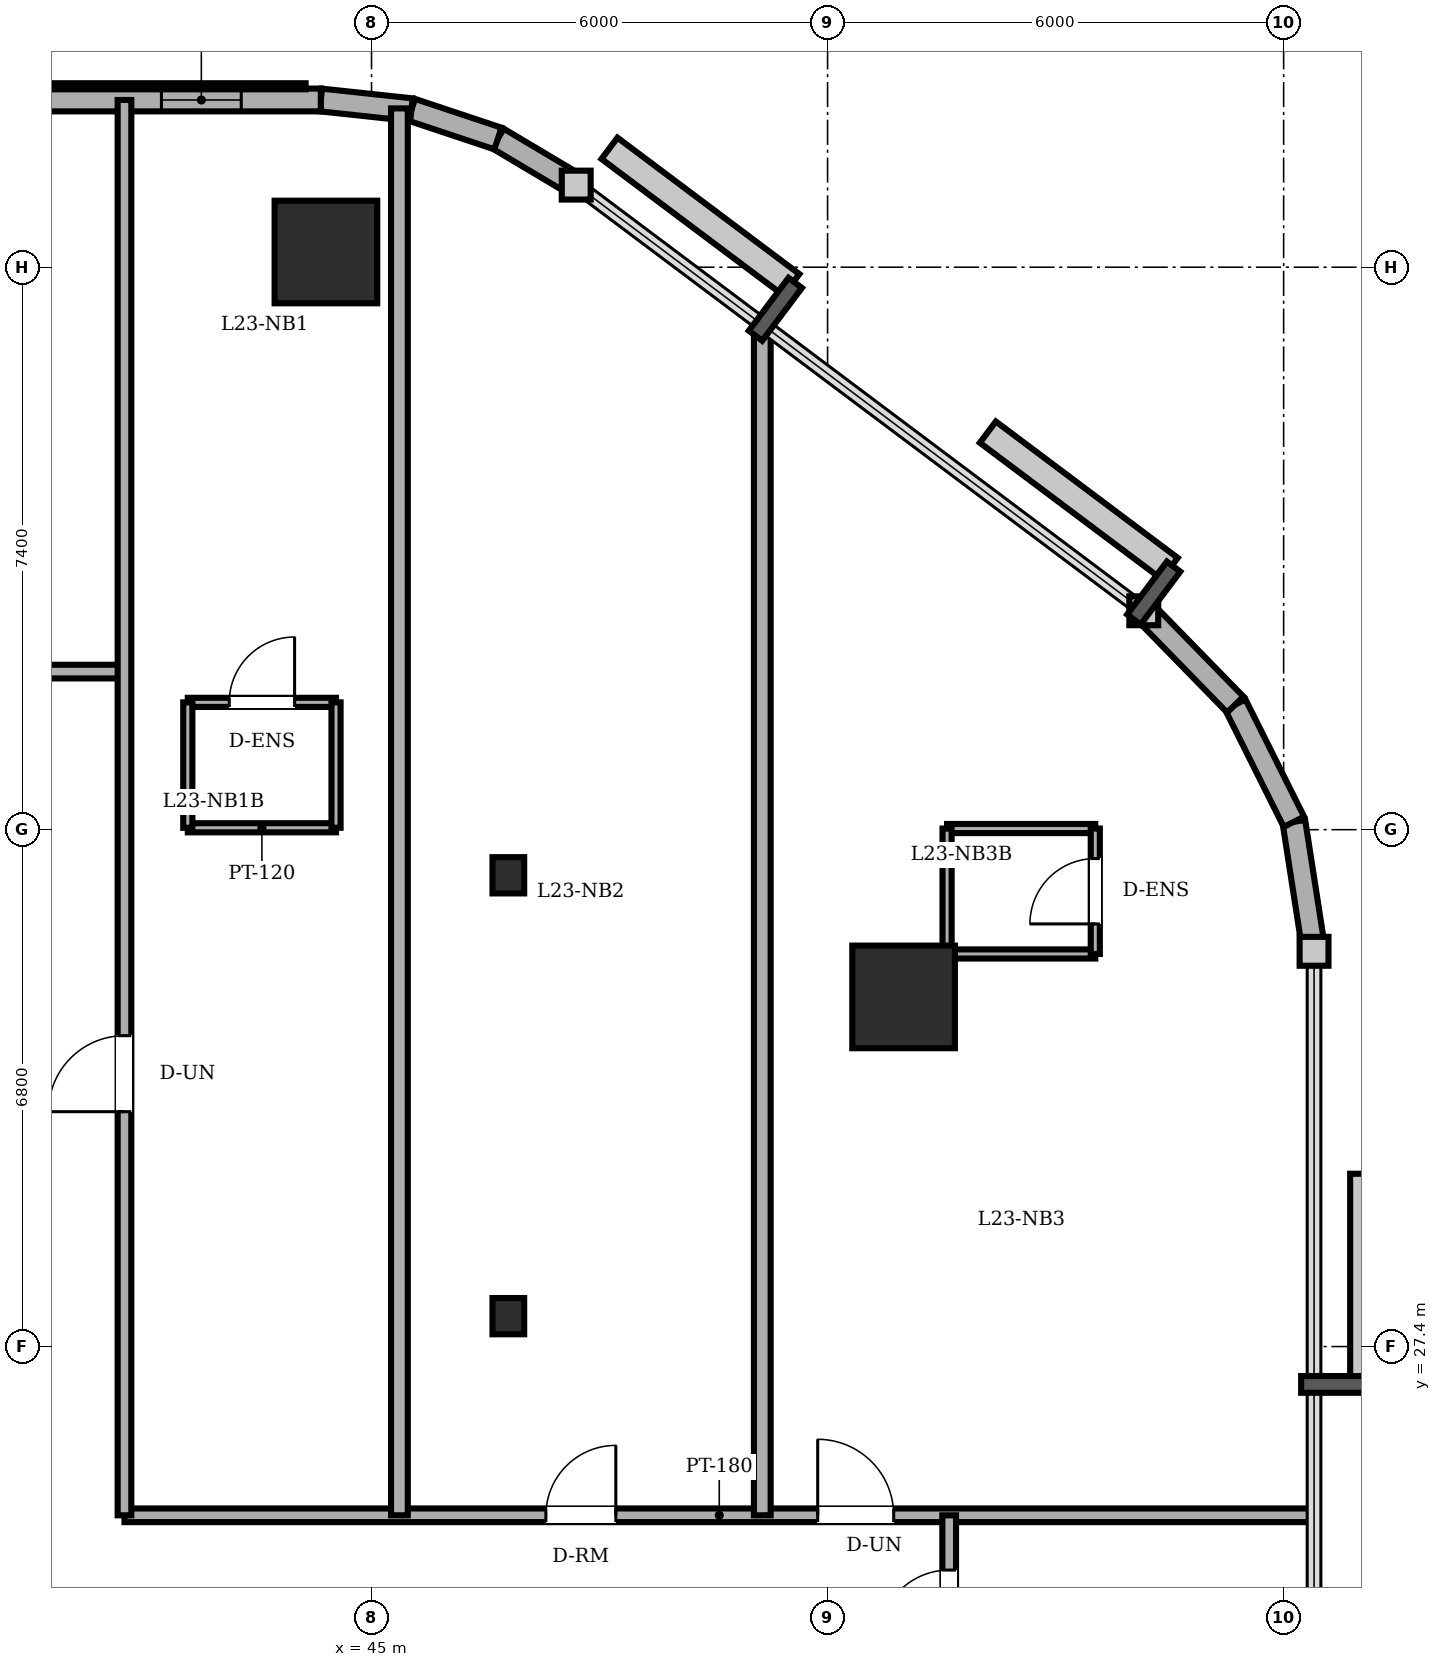
"""IFC4 building model, lengths in metres.
Left out: names, types, materials, properties, quantities, classifications, styles, units other than length and angle.
Written with IfcOpenShell. Run it as: python <this file> out.ifc"""

import sys

from ifc_helpers import new_model, si_unit, direction, frame, frame_2d, origin, origin_2d, place, context, subcontext, project, spatial, rectangle, circle, i_section, extrude, element, fill, save


model = new_model("IFC4")
c1 = context("Model", 3, precision=1e-05, world=origin(), true_north=direction((0.0, 1.0)))
c2 = subcontext(c1, "Body", "Model", "MODEL_VIEW")
j1 = project(units=[si_unit("LENGTHUNIT", "METRE"), si_unit("PLANEANGLEUNIT", "RADIAN")], contexts=[c1])
p1 = place(None, origin())
s1 = spatial("IfcSite", under=j1, at=p1, CompositionType="ELEMENT")
p2 = place(p1, origin())
s2 = spatial("IfcBuilding", under=s1, at=p2, CompositionType="ELEMENT")
p3 = place(p2, frame((0.0, 0.0, 89.9)))
s3 = spatial("IfcBuildingStorey", under=s2, at=p3, CompositionType="ELEMENT", Elevation=89.9)
for number, where, z_axis, x_axis in (
    (1, (52.0, 32.0, 0.0), (0.0, 0.0, 1.0), (1.0, 0.0, 0.0)),
    (2, (44.4, 41.8, 0.0), (0.0, 0.0, 1.0), (1.0, 0.0, 0.0)),
):
    element("IfcColumn", number, at=place(p3, frame(where, z_axis=z_axis, x_axis=x_axis)), inside=s3, PredefinedType="COLUMN", context=c2, shape_type="SweptSolid", body=[
        extrude(circle(Radius=0.675, at=origin_2d()), origin(), (0.0, 0.0, 1.0), 3.6),
    ])
for number, where, z_axis, x_axis in (
    (3, (46.8, 27.8, 0.0), (0.0, 0.0, 1.0), (1.0, 0.0, 0.0)),
    (4, (46.8, 33.6, 0.0), (0.0, 0.0, 1.0), (1.0, 0.0, 0.0)),
):
    element("IfcColumn", number, at=place(p3, frame(where, z_axis=z_axis, x_axis=x_axis)), inside=s3, PredefinedType="COLUMN", context=c2, shape_type="SweptSolid", body=[
        extrude(i_section(OverallWidth=0.417, OverallDepth=0.477, WebThickness=0.036, FlangeThickness=0.057, FilletRadius=0.015, at=origin_2d()), origin(), (0.0, 0.0, 1.0), 3.6),
    ])
p4 = place(p3, frame((57.4, 32.6, 0.0), z_axis=(0.0, 0.0, 1.0), x_axis=(-0.153620989032, 0.988129845581, 0.0)))
e5 = element("IfcWall", 5, at=p4, inside=s3, PredefinedType="SOLIDWALL", context=c2, shape_type="SweptSolid", body=[
    extrude(rectangle(XDim=1.724, YDim=0.3, at=frame_2d((0.862, 0.0))), origin(), (0.0, 0.0, 1.0), 3.4),
])
for number, where, z_axis, x_axis in (
    (6, (57.135, 34.304, 0.0), (0.0, 0.0, 1.0), (-0.447, 0.894, 0.0)),
    (7, (56.364, 35.846, 0.0), (0.0, 0.0, 1.0), (-0.698, 0.716, 0.0)),
):
    element("IfcWall", number, at=place(p3, frame(where, z_axis=z_axis, x_axis=x_axis)), inside=s3, PredefinedType="SOLIDWALL", context=c2, shape_type="SweptSolid", body=[
        extrude(rectangle(XDim=1.724, YDim=0.3, at=frame_2d((0.862, 0.0))), origin(), (0.0, 0.0, 1.0), 3.4),
    ])
p5 = place(p3, frame((47.693, 42.68, 0.0), z_axis=(0.0, 0.0, 1.0), x_axis=(-0.859320591642, 0.511437308749, 0.0)))
e8 = element("IfcWall", 8, at=p5, inside=s3, PredefinedType="SOLIDWALL", context=c2, shape_type="SweptSolid", body=[
    extrude(rectangle(XDim=1.199, YDim=0.3, at=frame_2d((0.599, 0.0))), origin(), (0.0, 0.0, 1.0), 3.4),
])
p6 = place(p3, frame((46.663, 43.293, 0.0), z_axis=(0.0, 0.0, 1.0), x_axis=(-0.948744332129, 0.316044604847, 0.0)))
e9 = element("IfcWall", 9, at=p6, inside=s3, PredefinedType="SOLIDWALL", context=c2, shape_type="SweptSolid", body=[
    extrude(rectangle(XDim=1.2, YDim=0.3, at=frame_2d((0.6, 0.0))), origin(), (0.0, 0.0, 1.0), 3.4),
])
p7 = place(p3, frame((45.525, 43.672, 0.0), z_axis=(0.0, 0.0, 1.0), x_axis=(-0.994289103787, 0.106720092254, 0.0)))
e10 = element("IfcWall", 10, at=p7, inside=s3, PredefinedType="SOLIDWALL", context=c2, shape_type="SweptSolid", body=[
    extrude(rectangle(XDim=1.199, YDim=0.3, at=frame_2d((0.599, 0.0))), origin(), (0.0, 0.0, 1.0), 3.4),
])
p8 = place(p3, frame((44.333, 43.8, 0.0), z_axis=(0.0, 0.0, 1.0), x_axis=(-1.0, 0.0, 0.0)))
e11 = element("IfcWall", 11, at=p8, inside=s3, PredefinedType="SOLIDWALL", context=c2, shape_type="SweptSolid", body=[
    extrude(rectangle(XDim=29.933, YDim=0.3, at=frame_2d((14.967, 0.0))), origin(), (0.0, 0.0, 1.0), 3.4),
])
p9 = place(p8, frame((24.058, 0.0, 0.0)))
e12 = element("IfcOpeningElement", 12, at=p9, cuts=e11, PredefinedType="OPENING", context=c2, shape_type="SweptSolid", body=[
    extrude(rectangle(XDim=0.95, YDim=2.2, at=frame_2d((0.475, 1.1))), frame((0.0, 0.16, 0.0), z_axis=(0.0, -1.0, 0.0), x_axis=(1.0, 0.0, 0.0)), (0.0, 0.0, 1.0), 0.32),
])
p10 = place(p8, frame((5.541, 0.0, 0.85)))
e13 = element("IfcOpeningElement", 13, at=p10, cuts=e11, PredefinedType="OPENING", context=c2, shape_type="SweptSolid", body=[
    extrude(rectangle(XDim=1.65, YDim=1.55, at=frame_2d((0.825, 0.775))), frame((0.0, 0.16, 0.0), z_axis=(0.0, -1.0, 0.0), x_axis=(1.0, 0.0, 0.0)), (0.0, 0.0, 1.0), 0.32),
])
p11 = place(p8, frame((9.325, 0.0, 0.85)))
e14 = element("IfcOpeningElement", 14, at=p11, cuts=e11, PredefinedType="OPENING", context=c2, shape_type="SweptSolid", body=[
    extrude(rectangle(XDim=1.65, YDim=1.55, at=frame_2d((0.825, 0.775))), frame((0.0, 0.16, 0.0), z_axis=(0.0, -1.0, 0.0), x_axis=(1.0, 0.0, 0.0)), (0.0, 0.0, 1.0), 0.32),
])
p12 = place(p8, frame((15.508, 0.0, 0.85)))
e15 = element("IfcOpeningElement", 15, at=p12, cuts=e11, PredefinedType="OPENING", context=c2, shape_type="SweptSolid", body=[
    extrude(rectangle(XDim=1.65, YDim=1.55, at=frame_2d((0.825, 0.775))), frame((0.0, 0.16, 0.0), z_axis=(0.0, -1.0, 0.0), x_axis=(1.0, 0.0, 0.0)), (0.0, 0.0, 1.0), 0.32),
])
p13 = place(p8, frame((17.908, 0.0, 0.85)))
e16 = element("IfcOpeningElement", 16, at=p13, cuts=e11, PredefinedType="OPENING", context=c2, shape_type="SweptSolid", body=[
    extrude(rectangle(XDim=1.65, YDim=1.55, at=frame_2d((0.825, 0.775))), frame((0.0, 0.16, 0.0), z_axis=(0.0, -1.0, 0.0), x_axis=(1.0, 0.0, 0.0)), (0.0, 0.0, 1.0), 0.32),
])
p14 = place(p8, frame((25.941, 0.0, 0.85)))
e17 = element("IfcOpeningElement", 17, at=p14, cuts=e11, PredefinedType="OPENING", context=c2, shape_type="SweptSolid", body=[
    extrude(rectangle(XDim=1.65, YDim=1.55, at=frame_2d((0.825, 0.775))), frame((0.0, 0.16, 0.0), z_axis=(0.0, -1.0, 0.0), x_axis=(1.0, 0.0, 0.0)), (0.0, 0.0, 1.0), 0.32),
])
p15 = place(p8, frame((1.047, 0.0, 0.85)))
e18 = element("IfcOpeningElement", 18, at=p15, cuts=e11, PredefinedType="OPENING", context=c2, shape_type="SweptSolid", body=[
    extrude(rectangle(XDim=1.05, YDim=1.55, at=frame_2d((0.525, 0.775))), frame((0.0, 0.16, 0.0), z_axis=(0.0, -1.0, 0.0), x_axis=(1.0, 0.0, 0.0)), (0.0, 0.0, 1.0), 0.32),
])
p16 = place(p3, frame((42.583, 35.875, 0.0), z_axis=(0.0, 0.0, 1.0), x_axis=(1.0, 0.0, 0.0)))
e19 = element("IfcWall", 19, at=p16, inside=s3, PredefinedType="PARTITIONING", context=c2, shape_type="SweptSolid", body=[
    extrude(rectangle(XDim=1.95, YDim=0.12, at=frame_2d((0.975, 0.0))), origin(), (0.0, 0.0, 1.0), 3.4),
])
p17 = place(p16, frame((0.545, 0.0, 0.0)))
e20 = element("IfcOpeningElement", 20, at=p17, cuts=e19, PredefinedType="OPENING", context=c2, shape_type="SweptSolid", body=[
    extrude(rectangle(XDim=0.86, YDim=2.1, at=frame_2d((0.43, 1.05))), frame((0.0, 0.07, 0.0), z_axis=(0.0, -1.0, 0.0), x_axis=(1.0, 0.0, 0.0)), (0.0, 0.0, 1.0), 0.14),
])
p18 = place(p3, frame((44.533, 34.225, 0.0), z_axis=(0.0, 0.0, 1.0), x_axis=(-1.0, 0.0, 0.0)))
e21 = element("IfcWall", 21, at=p18, inside=s3, PredefinedType="PARTITIONING", context=c2, shape_type="SweptSolid", body=[
    extrude(rectangle(XDim=1.95, YDim=0.12, at=frame_2d((0.975, 0.0))), origin(), (0.0, 0.0, 1.0), 3.4),
])
for number, where, z_axis, x_axis in (
    (22, (42.583, 35.875, 0.0), (0.0, 0.0, 1.0), (0.0, -1.0, 0.0)),
    (23, (44.533, 34.225, 0.0), (0.0, 0.0, 1.0), (0.0, 1.0, 0.0)),
):
    element("IfcWall", number, at=place(p3, frame(where, z_axis=z_axis, x_axis=x_axis)), inside=s3, PredefinedType="PARTITIONING", context=c2, shape_type="SweptSolid", body=[
        extrude(rectangle(XDim=1.65, YDim=0.12, at=frame_2d((0.825, 0.0))), origin(), (0.0, 0.0, 1.0), 3.4),
    ])
for number, where, z_axis, x_axis in (
    (24, (52.572, 34.215, 0.0), (0.0, 0.0, 1.0), (1.0, 0.0, 0.0)),
    (25, (54.522, 32.565, 0.0), (0.0, 0.0, 1.0), (-1.0, 0.0, 0.0)),
):
    element("IfcWall", number, at=place(p3, frame(where, z_axis=z_axis, x_axis=x_axis)), inside=s3, PredefinedType="PARTITIONING", context=c2, shape_type="SweptSolid", body=[
        extrude(rectangle(XDim=1.95, YDim=0.12, at=frame_2d((0.975, 0.0))), origin(), (0.0, 0.0, 1.0), 3.4),
    ])
p19 = place(p3, frame((52.572, 34.215, 0.0), z_axis=(0.0, 0.0, 1.0), x_axis=(0.0, -1.0, 0.0)))
e26 = element("IfcWall", 26, at=p19, inside=s3, PredefinedType="PARTITIONING", context=c2, shape_type="SweptSolid", body=[
    extrude(rectangle(XDim=1.65, YDim=0.12, at=frame_2d((0.825, 0.0))), origin(), (0.0, 0.0, 1.0), 3.4),
])
p20 = place(p3, frame((54.522, 32.565, 0.0), z_axis=(0.0, 0.0, 1.0), x_axis=(0.0, 1.0, 0.0)))
e27 = element("IfcWall", 27, at=p20, inside=s3, PredefinedType="PARTITIONING", context=c2, shape_type="SweptSolid", body=[
    extrude(rectangle(XDim=1.65, YDim=0.12, at=frame_2d((0.825, 0.0))), origin(), (0.0, 0.0, 1.0), 3.4),
])
p21 = place(p20, frame((0.395, 0.0, 0.0)))
e28 = element("IfcOpeningElement", 28, at=p21, cuts=e27, PredefinedType="OPENING", context=c2, shape_type="SweptSolid", body=[
    extrude(rectangle(XDim=0.86, YDim=2.1, at=frame_2d((0.43, 1.05))), frame((0.0, 0.07, 0.0), z_axis=(0.0, -1.0, 0.0), x_axis=(1.0, 0.0, 0.0)), (0.0, 0.0, 1.0), 0.14),
])
p22 = place(p3, frame((41.75, 25.18, 0.0), z_axis=(0.0, 0.0, 1.0), x_axis=(1.0, 0.0, 0.0)))
e29 = element("IfcWall", 29, at=p22, inside=s3, PredefinedType="PARTITIONING", context=c2, shape_type="SweptSolid", body=[
    extrude(rectangle(XDim=15.65, YDim=0.18, at=frame_2d((7.825, 0.0))), origin(), (0.0, 0.0, 1.0), 3.4),
])
p23 = place(p22, frame((5.544, 0.0, 0.0)))
e30 = element("IfcOpeningElement", 30, at=p23, cuts=e29, PredefinedType="OPENING", context=c2, shape_type="SweptSolid", body=[
    extrude(rectangle(XDim=0.92, YDim=2.1, at=frame_2d((0.46, 1.05))), frame((0.0, 0.1, 0.0), z_axis=(0.0, -1.0, 0.0), x_axis=(1.0, 0.0, 0.0)), (0.0, 0.0, 1.0), 0.2),
])
p24 = place(p22, frame((9.12, 0.0, 0.0)))
e31 = element("IfcOpeningElement", 31, at=p24, cuts=e29, PredefinedType="OPENING", context=c2, shape_type="SweptSolid", body=[
    extrude(rectangle(XDim=1.0, YDim=2.15, at=frame_2d((0.5, 1.075))), frame((0.0, 0.1, 0.0), z_axis=(0.0, -1.0, 0.0), x_axis=(1.0, 0.0, 0.0)), (0.0, 0.0, 1.0), 0.2),
])
p25 = place(p3, frame((8.8, 36.28, 0.0), z_axis=(0.0, 0.0, 1.0), x_axis=(1.0, 0.0, 0.0)))
e32 = element("IfcWall", 32, at=p25, inside=s3, PredefinedType="PARTITIONING", context=c2, shape_type="SweptSolid", body=[
    extrude(rectangle(XDim=32.95, YDim=0.18, at=frame_2d((16.475, 0.0))), origin(), (0.0, 0.0, 1.0), 3.4),
])
p26 = place(p25, frame((15.65, 0.0, 0.0)))
e33 = element("IfcOpeningElement", 33, at=p26, cuts=e32, PredefinedType="OPENING", context=c2, shape_type="SweptSolid", body=[
    extrude(rectangle(XDim=0.9, YDim=2.1, at=frame_2d((0.45, 1.05))), frame((0.0, 0.1, 0.0), z_axis=(0.0, -1.0, 0.0), x_axis=(1.0, 0.0, 0.0)), (0.0, 0.0, 1.0), 0.2),
])
p27 = place(p25, frame((19.27, 0.0, 0.0)))
e34 = element("IfcOpeningElement", 34, at=p27, cuts=e32, PredefinedType="OPENING", context=c2, shape_type="SweptSolid", body=[
    extrude(rectangle(XDim=0.86, YDim=2.1, at=frame_2d((0.43, 1.05))), frame((0.0, 0.1, 0.0), z_axis=(0.0, -1.0, 0.0), x_axis=(1.0, 0.0, 0.0)), (0.0, 0.0, 1.0), 0.2),
])
p28 = place(p25, frame((7.3, 0.0, 0.0)))
e35 = element("IfcOpeningElement", 35, at=p28, cuts=e32, PredefinedType="OPENING", context=c2, shape_type="SweptSolid", body=[
    extrude(rectangle(XDim=1.0, YDim=2.15, at=frame_2d((0.5, 1.075))), frame((0.0, 0.1, 0.0), z_axis=(0.0, -1.0, 0.0), x_axis=(1.0, 0.0, 0.0)), (0.0, 0.0, 1.0), 0.2),
])
p29 = place(p25, frame((26.555, 0.0, 0.0)))
e36 = element("IfcOpeningElement", 36, at=p29, cuts=e32, PredefinedType="OPENING", context=c2, shape_type="SweptSolid", body=[
    extrude(rectangle(XDim=0.92, YDim=2.1, at=frame_2d((0.46, 1.05))), frame((0.0, 0.1, 0.0), z_axis=(0.0, -1.0, 0.0), x_axis=(1.0, 0.0, 0.0)), (0.0, 0.0, 1.0), 0.2),
])
p30 = place(p3, frame((41.75, 25.18, 0.0), z_axis=(0.0, 0.0, 1.0), x_axis=(0.0, 1.0, 0.0)))
e37 = element("IfcWall", 37, at=p30, inside=s3, PredefinedType="PARTITIONING", context=c2, shape_type="SweptSolid", body=[
    extrude(rectangle(XDim=18.62, YDim=0.18, at=frame_2d((9.31, 0.0))), origin(), (0.0, 0.0, 1.0), 3.4),
])
p31 = place(p30, frame((5.31, 0.0, 0.0)))
e38 = element("IfcOpeningElement", 38, at=p31, cuts=e37, PredefinedType="OPENING", context=c2, shape_type="SweptSolid", body=[
    extrude(rectangle(XDim=1.0, YDim=2.15, at=frame_2d((0.5, 1.075))), frame((0.0, 0.1, 0.0), z_axis=(0.0, -1.0, 0.0), x_axis=(1.0, 0.0, 0.0)), (0.0, 0.0, 1.0), 0.2),
])
p32 = place(p3, frame((45.367, 25.18, 0.0), z_axis=(0.0, 0.0, 1.0), x_axis=(0.0, 1.0, 0.0)))
e39 = element("IfcWall", 39, at=p32, inside=s3, PredefinedType="PARTITIONING", context=c2, shape_type="SweptSolid", body=[
    extrude(rectangle(XDim=18.509, YDim=0.22, at=frame_2d((9.254, 0.0))), origin(), (0.0, 0.0, 1.0), 2.882),
])
p33 = place(p3, frame((50.141, 25.18, 0.0), z_axis=(0.0, 0.0, 1.0), x_axis=(0.0, 1.0, 0.0)))
e40 = element("IfcWall", 40, at=p33, inside=s3, PredefinedType="PARTITIONING", context=c2, shape_type="SweptSolid", body=[
    extrude(rectangle(XDim=15.664, YDim=0.22, at=frame_2d((7.832, 0.0))), origin(), (0.0, 0.0, 1.0), 3.4),
])
p34 = place(p3, frame((52.6, 22.82, 0.0), z_axis=(0.0, 0.0, 1.0), x_axis=(0.0, 1.0, 0.0)))
e41 = element("IfcWall", 41, at=p34, inside=s3, PredefinedType="PARTITIONING", context=c2, shape_type="SweptSolid", body=[
    extrude(rectangle(XDim=2.36, YDim=0.18, at=frame_2d((1.18, 0.0))), origin(), (0.0, 0.0, 1.0), 3.4),
])
p35 = place(p34, frame((0.72, 0.0, 0.0)))
e42 = element("IfcOpeningElement", 42, at=p35, cuts=e41, PredefinedType="OPENING", context=c2, shape_type="SweptSolid", body=[
    extrude(rectangle(XDim=0.92, YDim=2.1, at=frame_2d((0.46, 1.05))), frame((0.0, 0.1, 0.0), z_axis=(0.0, -1.0, 0.0), x_axis=(1.0, 0.0, 0.0)), (0.0, 0.0, 1.0), 0.2),
])
p36 = place(p15, origin())
e43 = element("IfcWindow", 43, at=p36, inside=s3, PartitioningType="SINGLE_PANEL", PredefinedType="WINDOW", context=c2, shape_type="SweptSolid", body=[
    extrude(rectangle(XDim=1.05, YDim=1.55, at=frame_2d((0.525, 0.775))), frame((0.0, 0.03, 0.0), z_axis=(0.0, -1.0, 0.0), x_axis=(1.0, 0.0, 0.0)), (0.0, 0.0, 1.0), 0.06),
])
fill(e18, e43)
p37 = place(p17, origin())
e44 = element("IfcDoor", 44, at=p37, inside=s3, OperationType="SINGLE_SWING_RIGHT", PredefinedType="DOOR", context=c2, shape_type="SweptSolid", body=[
    extrude(rectangle(XDim=0.86, YDim=2.1, at=frame_2d((0.43, 1.05))), frame((0.0, 0.025, 0.0), z_axis=(0.0, -1.0, 0.0), x_axis=(1.0, 0.0, 0.0)), (0.0, 0.0, 1.0), 0.05),
])
fill(e20, e44)
p38 = place(p21, origin())
e45 = element("IfcDoor", 45, at=p38, inside=s3, OperationType="SINGLE_SWING_LEFT", PredefinedType="DOOR", context=c2, shape_type="SweptSolid", body=[
    extrude(rectangle(XDim=0.86, YDim=2.1, at=frame_2d((0.43, 1.05))), frame((0.0, 0.025, 0.0), z_axis=(0.0, -1.0, 0.0), x_axis=(1.0, 0.0, 0.0)), (0.0, 0.0, 1.0), 0.05),
])
fill(e28, e45)
p39 = place(p31, origin())
e46 = element("IfcDoor", 46, at=p39, inside=s3, OperationType="SINGLE_SWING_LEFT", PredefinedType="DOOR", context=c2, shape_type="SweptSolid", body=[
    extrude(rectangle(XDim=1.0, YDim=2.15, at=frame_2d((0.5, 1.075))), frame((0.0, 0.025, 0.0), z_axis=(0.0, -1.0, 0.0), x_axis=(1.0, 0.0, 0.0)), (0.0, 0.0, 1.0), 0.05),
])
fill(e38, e46)
p40 = place(p23, origin())
e47 = element("IfcDoor", 47, at=p40, inside=s3, OperationType="SINGLE_SWING_RIGHT", PredefinedType="DOOR", context=c2, shape_type="SweptSolid", body=[
    extrude(rectangle(XDim=0.92, YDim=2.1, at=frame_2d((0.46, 1.05))), frame((0.0, 0.025, 0.0), z_axis=(0.0, -1.0, 0.0), x_axis=(1.0, 0.0, 0.0)), (0.0, 0.0, 1.0), 0.05),
])
fill(e30, e47)
p41 = place(p24, origin())
e48 = element("IfcDoor", 48, at=p41, inside=s3, OperationType="SINGLE_SWING_LEFT", PredefinedType="DOOR", context=c2, shape_type="SweptSolid", body=[
    extrude(rectangle(XDim=1.0, YDim=2.15, at=frame_2d((0.5, 1.075))), frame((0.0, 0.025, 0.0), z_axis=(0.0, -1.0, 0.0), x_axis=(1.0, 0.0, 0.0)), (0.0, 0.0, 1.0), 0.05),
])
fill(e31, e48)
p42 = place(p35, origin())
e49 = element("IfcDoor", 49, at=p42, inside=s3, OperationType="SINGLE_SWING_LEFT", PredefinedType="DOOR", context=c2, shape_type="SweptSolid", body=[
    extrude(rectangle(XDim=0.92, YDim=2.1, at=frame_2d((0.46, 1.05))), frame((0.0, 0.025, 0.0), z_axis=(0.0, -1.0, 0.0), x_axis=(1.0, 0.0, 0.0)), (0.0, 0.0, 1.0), 0.05),
])
fill(e42, e49)
save(model, sys.argv[1])
